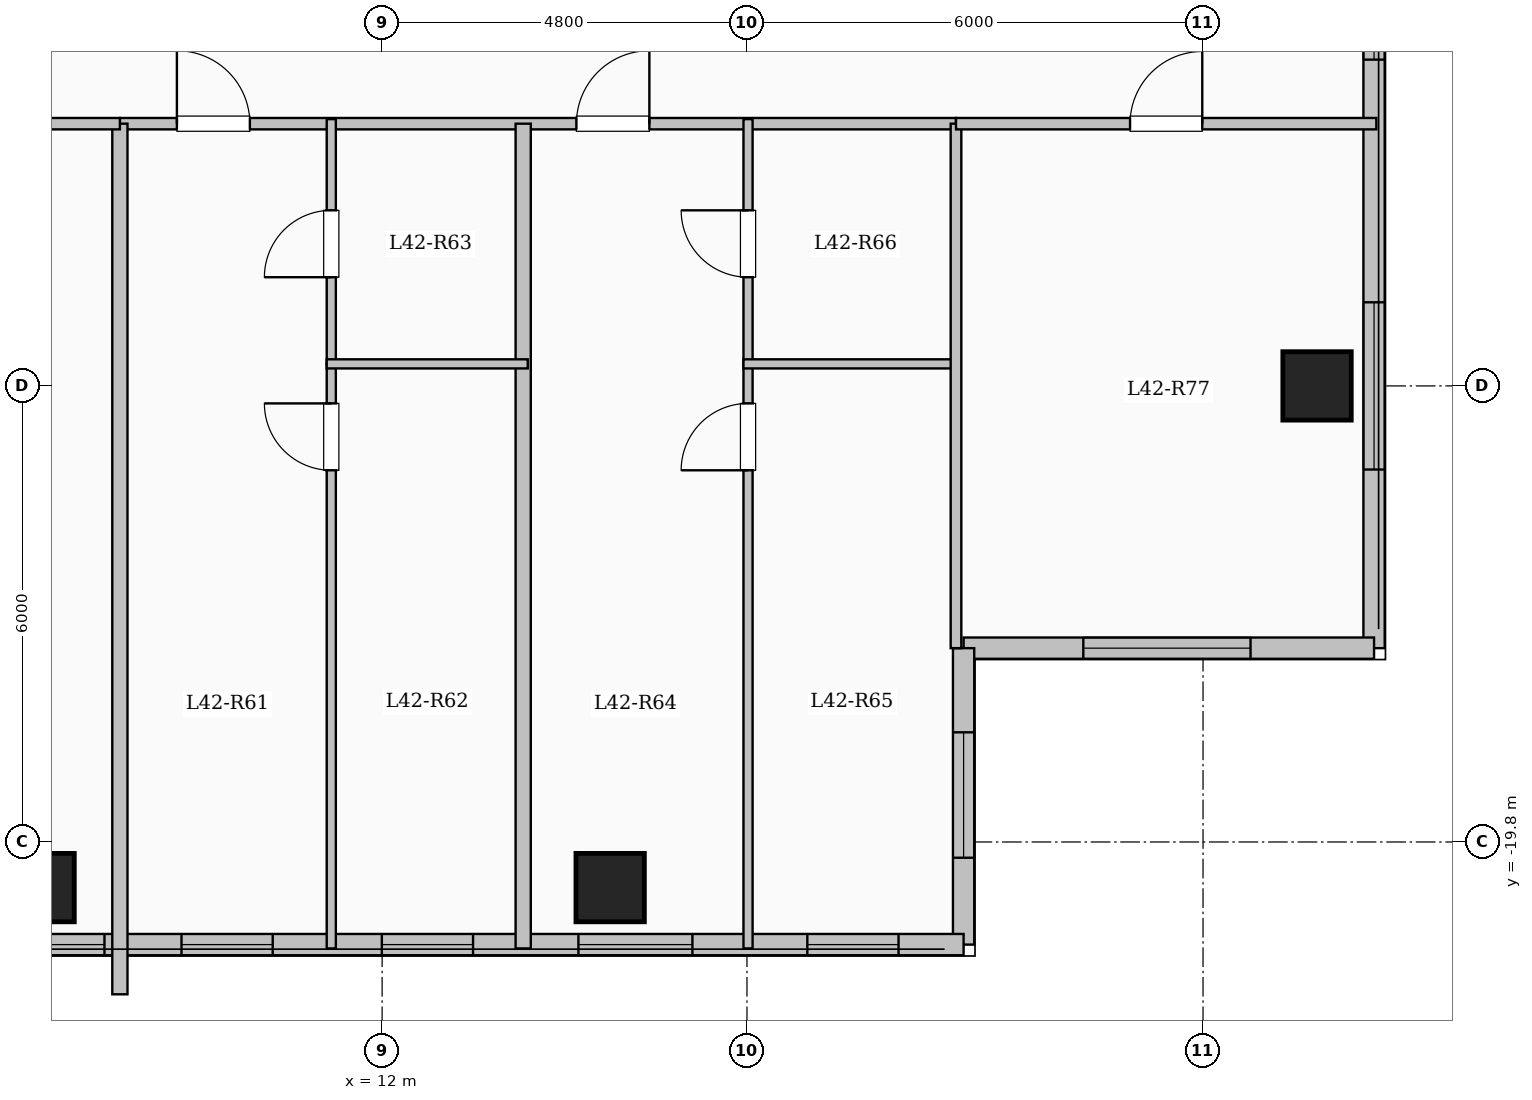
"""IFC4 building model, lengths in metres.
Left out: names, types, materials, properties, quantities, classifications, styles, units other than length and angle.
Written with IfcOpenShell. Run it as: python <this file> out.ifc"""

import sys

from ifc_helpers import new_model, si_unit, direction, frame, frame_2d, origin, origin_2d, place, context, subcontext, project, spatial, rectangle, extrude, element, fill, save


model = new_model("IFC4")
c1 = context("Model", 3, precision=1e-05, world=origin(), true_north=direction((0.0, 1.0)))
c2 = subcontext(c1, "Body", "Model", "MODEL_VIEW")
j1 = project(units=[si_unit("LENGTHUNIT", "METRE"), si_unit("PLANEANGLEUNIT", "RADIAN")], contexts=[c1])
p1 = place(None, origin())
s1 = spatial("IfcSite", under=j1, at=p1, CompositionType="ELEMENT")
p2 = place(p1, origin())
s2 = spatial("IfcBuilding", under=s1, at=p2, CompositionType="ELEMENT")
p3 = place(p2, frame((0.0, 0.0, 156.05)))
s3 = spatial("IfcBuildingStorey", under=s2, at=p3, CompositionType="ELEMENT", Elevation=156.05)
for number, where, z_axis, x_axis in (
    (1, (7.5, -20.4, 0.0), (0.0, 0.0, 1.0), (1.0, 0.0, 0.0)),
    (2, (15.0, -20.4, 0.0), (0.0, 0.0, 1.0), (1.0, 0.0, 0.0)),
    (3, (24.3, -13.8, 0.0), (0.0, 0.0, 1.0), (1.0, 0.0, 0.0)),
):
    element("IfcColumn", number, at=place(p3, frame(where, z_axis=z_axis, x_axis=x_axis)), inside=s3, PredefinedType="COLUMN", context=c2, shape_type="SweptSolid", body=[
        extrude(rectangle(XDim=0.9, YDim=0.9, at=origin_2d()), origin(), (0.0, 0.0, 1.0), 3.35),
    ])
p4 = place(p3, frame((25.05, 17.25, 0.0), z_axis=(0.0, 0.0, 1.0), x_axis=(0.0, -1.0, 0.0)))
e4 = element("IfcWall", 4, at=p4, inside=s3, PredefinedType="SOLIDWALL", context=c2, shape_type="SweptSolid", body=[
    extrude(rectangle(XDim=34.5, YDim=0.28, at=frame_2d((17.25, 0.0))), origin(), (0.0, 0.0, 1.0), 3.1),
])
p5 = place(p4, frame((1.375, 0.0, 0.9)))
e5 = element("IfcOpeningElement", 5, at=p5, cuts=e4, PredefinedType="OPENING", context=c2, shape_type="SweptSolid", body=[
    extrude(rectangle(XDim=2.0, YDim=1.7, at=frame_2d((1.0, 0.85))), frame((0.0, 0.15, 0.0), z_axis=(0.0, -1.0, 0.0), x_axis=(1.0, 0.0, 0.0)), (0.0, 0.0, 1.0), 0.3),
])
p6 = place(p4, frame((5.125, 0.0, 0.95)))
e6 = element("IfcOpeningElement", 6, at=p6, cuts=e4, PredefinedType="OPENING", context=c2, shape_type="SweptSolid", body=[
    extrude(rectangle(XDim=1.0, YDim=1.5, at=frame_2d((0.5, 0.75))), frame((0.0, 0.15, 0.0), z_axis=(0.0, -1.0, 0.0), x_axis=(1.0, 0.0, 0.0)), (0.0, 0.0, 1.0), 0.3),
])
p7 = place(p4, frame((14.5, 0.0, 0.9)))
e7 = element("IfcOpeningElement", 7, at=p7, cuts=e4, PredefinedType="OPENING", context=c2, shape_type="SweptSolid", body=[
    extrude(rectangle(XDim=2.0, YDim=1.7, at=frame_2d((1.0, 0.85))), frame((0.0, 0.15, 0.0), z_axis=(0.0, -1.0, 0.0), x_axis=(1.0, 0.0, 0.0)), (0.0, 0.0, 1.0), 0.3),
])
p8 = place(p4, frame((25.258, 0.0, 0.9)))
e8 = element("IfcOpeningElement", 8, at=p8, cuts=e4, PredefinedType="OPENING", context=c2, shape_type="SweptSolid", body=[
    extrude(rectangle(XDim=1.5, YDim=1.65, at=frame_2d((0.75, 0.825))), frame((0.0, 0.15, 0.0), z_axis=(0.0, -1.0, 0.0), x_axis=(1.0, 0.0, 0.0)), (0.0, 0.0, 1.0), 0.3),
])
p9 = place(p4, frame((29.95, 0.0, 0.9)))
e9 = element("IfcOpeningElement", 9, at=p9, cuts=e4, PredefinedType="OPENING", context=c2, shape_type="SweptSolid", body=[
    extrude(rectangle(XDim=2.2, YDim=1.75, at=frame_2d((1.1, 0.875))), frame((0.0, 0.15, 0.0), z_axis=(0.0, -1.0, 0.0), x_axis=(1.0, 0.0, 0.0)), (0.0, 0.0, 1.0), 0.3),
])
p10 = place(p3, frame((25.05, -17.25, 0.0), z_axis=(0.0, 0.0, 1.0), x_axis=(-1.0, 0.0, 0.0)))
e10 = element("IfcWall", 10, at=p10, inside=s3, PredefinedType="SOLIDWALL", context=c2, shape_type="SweptSolid", body=[
    extrude(rectangle(XDim=5.4, YDim=0.28, at=frame_2d((2.7, 0.0))), origin(), (0.0, 0.0, 1.0), 3.1),
])
p11 = place(p10, frame((1.625, 0.0, 0.9)))
e11 = element("IfcOpeningElement", 11, at=p11, cuts=e10, PredefinedType="OPENING", context=c2, shape_type="SweptSolid", body=[
    extrude(rectangle(XDim=2.2, YDim=1.75, at=frame_2d((1.1, 0.875))), frame((0.0, 0.15, 0.0), z_axis=(0.0, -1.0, 0.0), x_axis=(1.0, 0.0, 0.0)), (0.0, 0.0, 1.0), 0.3),
])
p12 = place(p3, frame((19.65, -17.25, 0.0), z_axis=(0.0, 0.0, 1.0), x_axis=(0.0, -1.0, 0.0)))
e12 = element("IfcWall", 12, at=p12, inside=s3, PredefinedType="SOLIDWALL", context=c2, shape_type="SweptSolid", body=[
    extrude(rectangle(XDim=3.9, YDim=0.28, at=frame_2d((1.95, 0.0))), origin(), (0.0, 0.0, 1.0), 3.1),
])
p13 = place(p12, frame((1.107, 0.0, 0.9)))
e13 = element("IfcOpeningElement", 13, at=p13, cuts=e12, PredefinedType="OPENING", context=c2, shape_type="SweptSolid", body=[
    extrude(rectangle(XDim=1.65, YDim=1.6, at=frame_2d((0.825, 0.8))), frame((0.0, 0.15, 0.0), z_axis=(0.0, -1.0, 0.0), x_axis=(1.0, 0.0, 0.0)), (0.0, 0.0, 1.0), 0.3),
])
p14 = place(p3, frame((19.65, -21.15, 0.0), z_axis=(0.0, 0.0, 1.0), x_axis=(-1.0, 0.0, 0.0)))
e14 = element("IfcWall", 14, at=p14, inside=s3, PredefinedType="SOLIDWALL", context=c2, shape_type="SweptSolid", body=[
    extrude(rectangle(XDim=12.3, YDim=0.28, at=frame_2d((6.15, 0.0))), origin(), (0.0, 0.0, 1.0), 3.1),
])
p15 = place(p14, frame((0.856, 0.0, 0.95)))
e15 = element("IfcOpeningElement", 15, at=p15, cuts=e14, PredefinedType="OPENING", context=c2, shape_type="SweptSolid", body=[
    extrude(rectangle(XDim=1.2, YDim=1.5, at=frame_2d((0.6, 0.75))), frame((0.0, 0.15, 0.0), z_axis=(0.0, -1.0, 0.0), x_axis=(1.0, 0.0, 0.0)), (0.0, 0.0, 1.0), 0.3),
])
p16 = place(p14, frame((3.568, 0.0, 0.9)))
e16 = element("IfcOpeningElement", 16, at=p16, cuts=e14, PredefinedType="OPENING", context=c2, shape_type="SweptSolid", body=[
    extrude(rectangle(XDim=1.5, YDim=1.65, at=frame_2d((0.75, 0.825))), frame((0.0, 0.15, 0.0), z_axis=(0.0, -1.0, 0.0), x_axis=(1.0, 0.0, 0.0)), (0.0, 0.0, 1.0), 0.3),
])
p17 = place(p14, frame((6.454, 0.0, 0.95)))
e17 = element("IfcOpeningElement", 17, at=p17, cuts=e14, PredefinedType="OPENING", context=c2, shape_type="SweptSolid", body=[
    extrude(rectangle(XDim=1.2, YDim=1.5, at=frame_2d((0.6, 0.75))), frame((0.0, 0.15, 0.0), z_axis=(0.0, -1.0, 0.0), x_axis=(1.0, 0.0, 0.0)), (0.0, 0.0, 1.0), 0.3),
])
p18 = place(p14, frame((9.089, 0.0, 0.95)))
e18 = element("IfcOpeningElement", 18, at=p18, cuts=e14, PredefinedType="OPENING", context=c2, shape_type="SweptSolid", body=[
    extrude(rectangle(XDim=1.2, YDim=1.5, at=frame_2d((0.6, 0.75))), frame((0.0, 0.15, 0.0), z_axis=(0.0, -1.0, 0.0), x_axis=(1.0, 0.0, 0.0)), (0.0, 0.0, 1.0), 0.3),
])
p19 = place(p14, frame((11.303, 0.0, 0.95)))
e19 = element("IfcOpeningElement", 19, at=p19, cuts=e14, PredefinedType="OPENING", context=c2, shape_type="SweptSolid", body=[
    extrude(rectangle(XDim=0.85, YDim=1.5, at=frame_2d((0.425, 0.75))), frame((0.0, 0.15, 0.0), z_axis=(0.0, -1.0, 0.0), x_axis=(1.0, 0.0, 0.0)), (0.0, 0.0, 1.0), 0.3),
])
p20 = place(p3, frame((8.55, -10.35, 0.0), z_axis=(0.0, 0.0, 1.0), x_axis=(1.0, 0.0, 0.0)))
e20 = element("IfcWall", 20, at=p20, inside=s3, PredefinedType="PARTITIONING", context=c2, shape_type="SweptSolid", body=[
    extrude(rectangle(XDim=11.0, YDim=0.15, at=frame_2d((5.5, 0.0))), origin(), (0.0, 0.0, 1.0), 3.1),
])
p21 = place(p20, frame((0.75, 0.0, 0.0)))
e21 = element("IfcOpeningElement", 21, at=p21, cuts=e20, PredefinedType="OPENING", context=c2, shape_type="SweptSolid", body=[
    extrude(rectangle(XDim=0.96, YDim=2.15, at=frame_2d((0.48, 1.075))), frame((0.0, 0.085, 0.0), z_axis=(0.0, -1.0, 0.0), x_axis=(1.0, 0.0, 0.0)), (0.0, 0.0, 1.0), 0.17),
])
p22 = place(p20, frame((6.006, 0.0, 0.0)))
e22 = element("IfcOpeningElement", 22, at=p22, cuts=e20, PredefinedType="OPENING", context=c2, shape_type="SweptSolid", body=[
    extrude(rectangle(XDim=0.96, YDim=2.15, at=frame_2d((0.48, 1.075))), frame((0.0, 0.085, 0.0), z_axis=(0.0, -1.0, 0.0), x_axis=(1.0, 0.0, 0.0)), (0.0, 0.0, 1.0), 0.17),
])
p23 = place(p3, frame((13.856, -21.2, 0.0), z_axis=(0.0, 0.0, 1.0), x_axis=(0.0, 1.0, 0.0)))
e23 = element("IfcWall", 23, at=p23, inside=s3, PredefinedType="SOLIDWALL", context=c2, shape_type="SweptSolid", body=[
    extrude(rectangle(XDim=10.85, YDim=0.2, at=frame_2d((5.425, 0.0))), origin(), (0.0, 0.0, 1.0), 3.1),
])
p24 = place(p3, frame((11.331, -21.2, 0.0), z_axis=(0.0, 0.0, 1.0), x_axis=(0.0, 1.0, 0.0)))
e24 = element("IfcWall", 24, at=p24, inside=s3, PredefinedType="PARTITIONING", context=c2, shape_type="SweptSolid", body=[
    extrude(rectangle(XDim=7.69, YDim=0.12, at=frame_2d((3.845, 0.0))), origin(), (0.0, 0.0, 1.0), 3.1),
])
p25 = place(p24, frame((6.29, 0.0, 0.0)))
e25 = element("IfcOpeningElement", 25, at=p25, cuts=e24, PredefinedType="OPENING", context=c2, shape_type="SweptSolid", body=[
    extrude(rectangle(XDim=0.88, YDim=2.1, at=frame_2d((0.44, 1.05))), frame((0.0, 0.07, 0.0), z_axis=(0.0, -1.0, 0.0), x_axis=(1.0, 0.0, 0.0)), (0.0, 0.0, 1.0), 0.14),
])
p26 = place(p3, frame((11.331, -13.51, 0.0), z_axis=(0.0, 0.0, 1.0), x_axis=(0.0, 1.0, 0.0)))
e26 = element("IfcWall", 26, at=p26, inside=s3, PredefinedType="PARTITIONING", context=c2, shape_type="SweptSolid", body=[
    extrude(rectangle(XDim=3.22, YDim=0.12, at=frame_2d((1.61, 0.0))), origin(), (0.0, 0.0, 1.0), 3.1),
])
p27 = place(p26, frame((1.14, 0.0, 0.0)))
e27 = element("IfcOpeningElement", 27, at=p27, cuts=e26, PredefinedType="OPENING", context=c2, shape_type="SweptSolid", body=[
    extrude(rectangle(XDim=0.88, YDim=2.1, at=frame_2d((0.44, 1.05))), frame((0.0, 0.07, 0.0), z_axis=(0.0, -1.0, 0.0), x_axis=(1.0, 0.0, 0.0)), (0.0, 0.0, 1.0), 0.14),
])
p28 = place(p3, frame((11.271, -13.51, 0.0), z_axis=(0.0, 0.0, 1.0), x_axis=(1.0, 0.0, 0.0)))
e28 = element("IfcWall", 28, at=p28, inside=s3, PredefinedType="PARTITIONING", context=c2, shape_type="SweptSolid", body=[
    extrude(rectangle(XDim=2.645, YDim=0.12, at=frame_2d((1.323, 0.0))), origin(), (0.0, 0.0, 1.0), 3.1),
])
p29 = place(p3, frame((16.814, -21.2, 0.0), z_axis=(0.0, 0.0, 1.0), x_axis=(0.0, 1.0, 0.0)))
e29 = element("IfcWall", 29, at=p29, inside=s3, PredefinedType="PARTITIONING", context=c2, shape_type="SweptSolid", body=[
    extrude(rectangle(XDim=7.69, YDim=0.12, at=frame_2d((3.845, 0.0))), origin(), (0.0, 0.0, 1.0), 3.1),
])
p30 = place(p29, frame((6.29, 0.0, 0.0)))
e30 = element("IfcOpeningElement", 30, at=p30, cuts=e29, PredefinedType="OPENING", context=c2, shape_type="SweptSolid", body=[
    extrude(rectangle(XDim=0.88, YDim=2.1, at=frame_2d((0.44, 1.05))), frame((0.0, 0.07, 0.0), z_axis=(0.0, -1.0, 0.0), x_axis=(1.0, 0.0, 0.0)), (0.0, 0.0, 1.0), 0.14),
])
p31 = place(p3, frame((16.814, -13.51, 0.0), z_axis=(0.0, 0.0, 1.0), x_axis=(0.0, 1.0, 0.0)))
e31 = element("IfcWall", 31, at=p31, inside=s3, PredefinedType="PARTITIONING", context=c2, shape_type="SweptSolid", body=[
    extrude(rectangle(XDim=3.22, YDim=0.12, at=frame_2d((1.61, 0.0))), origin(), (0.0, 0.0, 1.0), 3.1),
])
p32 = place(p31, frame((1.14, 0.0, 0.0)))
e32 = element("IfcOpeningElement", 32, at=p32, cuts=e31, PredefinedType="OPENING", context=c2, shape_type="SweptSolid", body=[
    extrude(rectangle(XDim=0.88, YDim=2.1, at=frame_2d((0.44, 1.05))), frame((0.0, 0.07, 0.0), z_axis=(0.0, -1.0, 0.0), x_axis=(1.0, 0.0, 0.0)), (0.0, 0.0, 1.0), 0.14),
])
p33 = place(p3, frame((16.754, -13.51, 0.0), z_axis=(0.0, 0.0, 1.0), x_axis=(1.0, 0.0, 0.0)))
e33 = element("IfcWall", 33, at=p33, inside=s3, PredefinedType="PARTITIONING", context=c2, shape_type="SweptSolid", body=[
    extrude(rectangle(XDim=2.856, YDim=0.12, at=frame_2d((1.428, 0.0))), origin(), (0.0, 0.0, 1.0), 3.1),
])
p34 = place(p3, frame((8.55, -21.804, 0.0), z_axis=(0.0, 0.0, 1.0), x_axis=(0.0, 1.0, 0.0)))
e34 = element("IfcWall", 34, at=p34, inside=s3, PredefinedType="SOLIDWALL", context=c2, shape_type="SweptSolid", body=[
    extrude(rectangle(XDim=11.454, YDim=0.2, at=frame_2d((5.727, 0.0))), origin(), (0.0, 0.0, 1.0), 3.1),
])
p35 = place(p3, frame((-8.55, -10.35, 0.0), z_axis=(0.0, 0.0, 1.0), x_axis=(1.0, 0.0, 0.0)))
e35 = element("IfcWall", 35, at=p35, inside=s3, PredefinedType="PARTITIONING", context=c2, shape_type="SweptSolid", body=[
    extrude(rectangle(XDim=17.1, YDim=0.15, at=frame_2d((8.55, 0.0))), origin(), (0.0, 0.0, 1.0), 3.1),
])
p36 = place(p35, frame((1.6, 0.0, 0.0)))
e36 = element("IfcOpeningElement", 36, at=p36, cuts=e35, PredefinedType="OPENING", context=c2, shape_type="SweptSolid", body=[
    extrude(rectangle(XDim=0.95, YDim=2.15, at=frame_2d((0.475, 1.075))), frame((0.0, 0.085, 0.0), z_axis=(0.0, -1.0, 0.0), x_axis=(1.0, 0.0, 0.0)), (0.0, 0.0, 1.0), 0.17),
])
p37 = place(p35, frame((10.5, 0.0, 0.0)))
e37 = element("IfcOpeningElement", 37, at=p37, cuts=e35, PredefinedType="OPENING", context=c2, shape_type="SweptSolid", body=[
    extrude(rectangle(XDim=0.95, YDim=2.15, at=frame_2d((0.475, 1.075))), frame((0.0, 0.085, 0.0), z_axis=(0.0, -1.0, 0.0), x_axis=(1.0, 0.0, 0.0)), (0.0, 0.0, 1.0), 0.17),
])
p38 = place(p3, frame((19.55, -17.25, 0.0), z_axis=(0.0, 0.0, 1.0), x_axis=(0.0, 1.0, 0.0)))
e38 = element("IfcWall", 38, at=p38, inside=s3, PredefinedType="PARTITIONING", context=c2, shape_type="SweptSolid", body=[
    extrude(rectangle(XDim=6.9, YDim=0.14, at=frame_2d((3.45, 0.0))), origin(), (0.0, 0.0, 1.0), 3.1),
])
p39 = place(p3, frame((19.55, -10.35, 0.0), z_axis=(0.0, 0.0, 1.0), x_axis=(1.0, 0.0, 0.0)))
e39 = element("IfcWall", 39, at=p39, inside=s3, PredefinedType="PARTITIONING", context=c2, shape_type="SweptSolid", body=[
    extrude(rectangle(XDim=5.53, YDim=0.15, at=frame_2d((2.765, 0.0))), origin(), (0.0, 0.0, 1.0), 3.1),
])
p40 = place(p39, frame((2.29, 0.0, 0.0)))
e40 = element("IfcOpeningElement", 40, at=p40, cuts=e39, PredefinedType="OPENING", context=c2, shape_type="SweptSolid", body=[
    extrude(rectangle(XDim=0.95, YDim=2.15, at=frame_2d((0.475, 1.075))), frame((0.0, 0.085, 0.0), z_axis=(0.0, -1.0, 0.0), x_axis=(1.0, 0.0, 0.0)), (0.0, 0.0, 1.0), 0.17),
])
p41 = place(p8, origin())
e41 = element("IfcWindow", 41, at=p41, inside=s3, PartitioningType="SINGLE_PANEL", PredefinedType="WINDOW", context=c2, shape_type="SweptSolid", body=[
    extrude(rectangle(XDim=1.5, YDim=1.65, at=frame_2d((0.75, 0.825))), frame((0.0, 0.03, 0.0), z_axis=(0.0, -1.0, 0.0), x_axis=(1.0, 0.0, 0.0)), (0.0, 0.0, 1.0), 0.06),
])
fill(e8, e41)
p42 = place(p9, origin())
e42 = element("IfcWindow", 42, at=p42, inside=s3, PartitioningType="SINGLE_PANEL", PredefinedType="WINDOW", context=c2, shape_type="SweptSolid", body=[
    extrude(rectangle(XDim=2.2, YDim=1.75, at=frame_2d((1.1, 0.875))), frame((0.0, 0.03, 0.0), z_axis=(0.0, -1.0, 0.0), x_axis=(1.0, 0.0, 0.0)), (0.0, 0.0, 1.0), 0.06),
])
fill(e9, e42)
p43 = place(p11, origin())
e43 = element("IfcWindow", 43, at=p43, inside=s3, PartitioningType="SINGLE_PANEL", PredefinedType="WINDOW", context=c2, shape_type="SweptSolid", body=[
    extrude(rectangle(XDim=2.2, YDim=1.75, at=frame_2d((1.1, 0.875))), frame((0.0, 0.03, 0.0), z_axis=(0.0, -1.0, 0.0), x_axis=(1.0, 0.0, 0.0)), (0.0, 0.0, 1.0), 0.06),
])
fill(e11, e43)
p44 = place(p13, origin())
e44 = element("IfcWindow", 44, at=p44, inside=s3, PartitioningType="SINGLE_PANEL", PredefinedType="WINDOW", context=c2, shape_type="SweptSolid", body=[
    extrude(rectangle(XDim=1.65, YDim=1.6, at=frame_2d((0.825, 0.8))), frame((0.0, 0.03, 0.0), z_axis=(0.0, -1.0, 0.0), x_axis=(1.0, 0.0, 0.0)), (0.0, 0.0, 1.0), 0.06),
])
fill(e13, e44)
p45 = place(p15, origin())
e45 = element("IfcWindow", 45, at=p45, inside=s3, PartitioningType="SINGLE_PANEL", PredefinedType="WINDOW", context=c2, shape_type="SweptSolid", body=[
    extrude(rectangle(XDim=1.2, YDim=1.5, at=frame_2d((0.6, 0.75))), frame((0.0, 0.03, 0.0), z_axis=(0.0, -1.0, 0.0), x_axis=(1.0, 0.0, 0.0)), (0.0, 0.0, 1.0), 0.06),
])
fill(e15, e45)
p46 = place(p16, origin())
e46 = element("IfcWindow", 46, at=p46, inside=s3, PartitioningType="SINGLE_PANEL", PredefinedType="WINDOW", context=c2, shape_type="SweptSolid", body=[
    extrude(rectangle(XDim=1.5, YDim=1.65, at=frame_2d((0.75, 0.825))), frame((0.0, 0.03, 0.0), z_axis=(0.0, -1.0, 0.0), x_axis=(1.0, 0.0, 0.0)), (0.0, 0.0, 1.0), 0.06),
])
fill(e16, e46)
p47 = place(p17, origin())
e47 = element("IfcWindow", 47, at=p47, inside=s3, PartitioningType="SINGLE_PANEL", PredefinedType="WINDOW", context=c2, shape_type="SweptSolid", body=[
    extrude(rectangle(XDim=1.2, YDim=1.5, at=frame_2d((0.6, 0.75))), frame((0.0, 0.03, 0.0), z_axis=(0.0, -1.0, 0.0), x_axis=(1.0, 0.0, 0.0)), (0.0, 0.0, 1.0), 0.06),
])
fill(e17, e47)
p48 = place(p18, origin())
e48 = element("IfcWindow", 48, at=p48, inside=s3, PartitioningType="SINGLE_PANEL", PredefinedType="WINDOW", context=c2, shape_type="SweptSolid", body=[
    extrude(rectangle(XDim=1.2, YDim=1.5, at=frame_2d((0.6, 0.75))), frame((0.0, 0.03, 0.0), z_axis=(0.0, -1.0, 0.0), x_axis=(1.0, 0.0, 0.0)), (0.0, 0.0, 1.0), 0.06),
])
fill(e18, e48)
p49 = place(p19, origin())
e49 = element("IfcWindow", 49, at=p49, inside=s3, PartitioningType="SINGLE_PANEL", PredefinedType="WINDOW", context=c2, shape_type="SweptSolid", body=[
    extrude(rectangle(XDim=0.85, YDim=1.5, at=frame_2d((0.425, 0.75))), frame((0.0, 0.03, 0.0), z_axis=(0.0, -1.0, 0.0), x_axis=(1.0, 0.0, 0.0)), (0.0, 0.0, 1.0), 0.06),
])
fill(e19, e49)
p50 = place(p21, origin())
e50 = element("IfcDoor", 50, at=p50, inside=s3, OperationType="SINGLE_SWING_LEFT", PredefinedType="DOOR", context=c2, shape_type="SweptSolid", body=[
    extrude(rectangle(XDim=0.96, YDim=2.15, at=frame_2d((0.48, 1.075))), frame((0.0, 0.025, 0.0), z_axis=(0.0, -1.0, 0.0), x_axis=(1.0, 0.0, 0.0)), (0.0, 0.0, 1.0), 0.05),
])
fill(e21, e50)
p51 = place(p25, origin())
e51 = element("IfcDoor", 51, at=p51, inside=s3, OperationType="SINGLE_SWING_RIGHT", PredefinedType="DOOR", context=c2, shape_type="SweptSolid", body=[
    extrude(rectangle(XDim=0.88, YDim=2.1, at=frame_2d((0.44, 1.05))), frame((0.0, 0.025, 0.0), z_axis=(0.0, -1.0, 0.0), x_axis=(1.0, 0.0, 0.0)), (0.0, 0.0, 1.0), 0.05),
])
fill(e25, e51)
p52 = place(p27, origin())
e52 = element("IfcDoor", 52, at=p52, inside=s3, OperationType="SINGLE_SWING_LEFT", PredefinedType="DOOR", context=c2, shape_type="SweptSolid", body=[
    extrude(rectangle(XDim=0.88, YDim=2.1, at=frame_2d((0.44, 1.05))), frame((0.0, 0.025, 0.0), z_axis=(0.0, -1.0, 0.0), x_axis=(1.0, 0.0, 0.0)), (0.0, 0.0, 1.0), 0.05),
])
fill(e27, e52)
p53 = place(p22, origin())
e53 = element("IfcDoor", 53, at=p53, inside=s3, OperationType="SINGLE_SWING_RIGHT", PredefinedType="DOOR", context=c2, shape_type="SweptSolid", body=[
    extrude(rectangle(XDim=0.96, YDim=2.15, at=frame_2d((0.48, 1.075))), frame((0.0, 0.025, 0.0), z_axis=(0.0, -1.0, 0.0), x_axis=(1.0, 0.0, 0.0)), (0.0, 0.0, 1.0), 0.05),
])
fill(e22, e53)
p54 = place(p30, origin())
e54 = element("IfcDoor", 54, at=p54, inside=s3, OperationType="SINGLE_SWING_LEFT", PredefinedType="DOOR", context=c2, shape_type="SweptSolid", body=[
    extrude(rectangle(XDim=0.88, YDim=2.1, at=frame_2d((0.44, 1.05))), frame((0.0, 0.025, 0.0), z_axis=(0.0, -1.0, 0.0), x_axis=(1.0, 0.0, 0.0)), (0.0, 0.0, 1.0), 0.05),
])
fill(e30, e54)
p55 = place(p32, origin())
e55 = element("IfcDoor", 55, at=p55, inside=s3, OperationType="SINGLE_SWING_RIGHT", PredefinedType="DOOR", context=c2, shape_type="SweptSolid", body=[
    extrude(rectangle(XDim=0.88, YDim=2.1, at=frame_2d((0.44, 1.05))), frame((0.0, 0.025, 0.0), z_axis=(0.0, -1.0, 0.0), x_axis=(1.0, 0.0, 0.0)), (0.0, 0.0, 1.0), 0.05),
])
fill(e32, e55)
p56 = place(p40, origin())
e56 = element("IfcDoor", 56, at=p56, inside=s3, OperationType="SINGLE_SWING_RIGHT", PredefinedType="DOOR", context=c2, shape_type="SweptSolid", body=[
    extrude(rectangle(XDim=0.95, YDim=2.15, at=frame_2d((0.475, 1.075))), frame((0.0, 0.025, 0.0), z_axis=(0.0, -1.0, 0.0), x_axis=(1.0, 0.0, 0.0)), (0.0, 0.0, 1.0), 0.05),
])
fill(e40, e56)
save(model, sys.argv[1])
